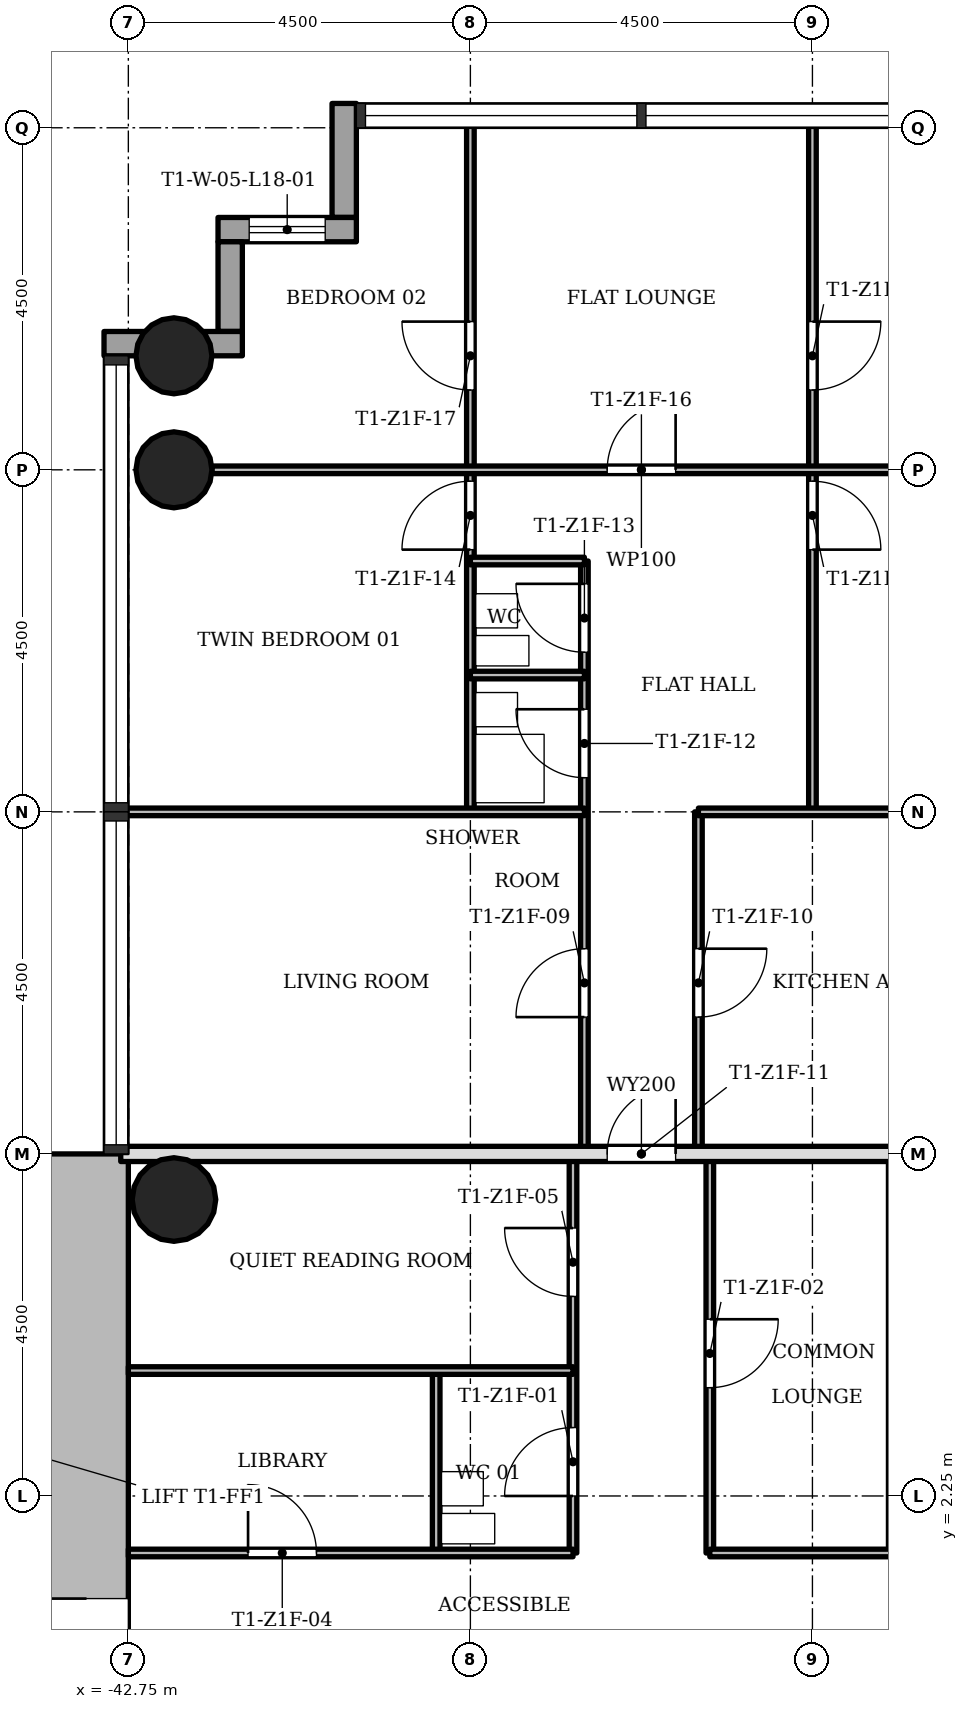
"""IFC4 building model, lengths in metres.
Left out: names, types, materials, properties, quantities, classifications, styles, units other than length and angle.
Written with IfcOpenShell. Run it as: python <this file> out.ifc"""

import sys

from ifc_helpers import new_model, si_unit, direction, frame, frame_2d, origin, origin_2d, place, context, subcontext, project, spatial, rectangle, hollow_circle, extrude, element, fill, save


model = new_model("IFC4")
c1 = context("Model", 3, precision=1e-05, world=origin(), true_north=direction((0.0, 1.0)))
c2 = subcontext(c1, "Body", "Model", "MODEL_VIEW")
j1 = project(units=[si_unit("LENGTHUNIT", "METRE"), si_unit("PLANEANGLEUNIT", "RADIAN")], contexts=[c1])
p1 = place(None, origin())
s1 = spatial("IfcSite", under=j1, at=p1, CompositionType="ELEMENT")
p2 = place(p1, origin())
s2 = spatial("IfcBuilding", under=s1, at=p2, CompositionType="ELEMENT")
p3 = place(p2, frame((0.0, 0.0, 68.7)))
s3 = spatial("IfcBuildingStorey", under=s2, at=p3, CompositionType="ELEMENT", Elevation=68.7)
p4 = place(p3, frame((-43.3, -5.65, 0.0), z_axis=(0.0, 0.0, 1.0), x_axis=(0.0, 1.0, 0.0)))
e1 = element("IfcWall", 1, at=p4, inside=s3, PredefinedType="SHEAR", context=c2, shape_type="SweptSolid", body=[
    extrude(rectangle(XDim=12.4, YDim=1.1, at=frame_2d((6.2, 0.0))), origin(), (0.0, 0.0, 1.0), 3.4),
])
p5 = place(p4, frame((4.75, 0.0, 0.0)))
e2 = element("IfcOpeningElement", 2, at=p5, cuts=e1, PredefinedType="OPENING", context=c2, shape_type="SweptSolid", body=[
    extrude(rectangle(XDim=1.8, YDim=2.1, at=frame_2d((0.9, 1.05))), frame((0.0, 0.56, 0.0), z_axis=(0.0, -1.0, 0.0), x_axis=(1.0, 0.0, 0.0)), (0.0, 0.0, 1.0), 1.12),
])
for number, where, z_axis, x_axis in (
    (3, (-42.15, 15.75, 0.0), (0.0, 0.0, 1.0), (1.0, 0.0, 0.0)),
    (4, (-42.15, 17.25, 0.0), (0.0, 0.0, 1.0), (1.0, 0.0, 0.0)),
):
    element("IfcColumn", number, at=place(p3, frame(where, z_axis=z_axis, x_axis=x_axis)), inside=s3, PredefinedType="COLUMN", context=c2, shape_type="SweptSolid", body=[
        extrude(hollow_circle(Radius=0.5, WallThickness=0.036, at=origin_2d()), origin(), (0.0, 0.0, 1.0), 3.4),
    ])
p6 = place(p3, frame((-42.15, 6.15, 0.0), z_axis=(0.0, 0.0, 1.0), x_axis=(1.0, 0.0, 0.0)))
e5 = element("IfcColumn", 5, at=p6, inside=s3, PredefinedType="COLUMN", context=c2, shape_type="SweptSolid", body=[
    extrude(hollow_circle(Radius=0.55, WallThickness=0.04, at=origin_2d()), origin(), (0.0, 0.0, 1.0), 3.4),
])
p7 = place(p3, frame((-39.91, 20.57, -0.3), z_axis=(0.0, 0.0, 1.0), x_axis=(0.0, -1.0, 0.0)))
e6 = element("IfcWall", 6, at=p7, inside=s3, PredefinedType="STANDARD", context=c2, shape_type="SweptSolid", body=[
    extrude(rectangle(XDim=1.5, YDim=0.32, at=frame_2d((0.75, 0.0))), origin(), (0.0, 0.0, 1.0), 3.4),
])
p8 = place(p3, frame((-39.75, 18.91, -0.3), z_axis=(0.0, 0.0, 1.0), x_axis=(-1.0, 0.0, 0.0)))
e7 = element("IfcWall", 7, at=p8, inside=s3, PredefinedType="STANDARD", context=c2, shape_type="SweptSolid", body=[
    extrude(rectangle(XDim=1.82, YDim=0.32, at=frame_2d((0.91, 0.0))), origin(), (0.0, 0.0, 1.0), 3.4),
])
p9 = place(p8, frame((0.41, 0.0, 1.2)))
e8 = element("IfcOpeningElement", 8, at=p9, cuts=e7, PredefinedType="OPENING", context=c2, shape_type="SweptSolid", body=[
    extrude(rectangle(XDim=1.0, YDim=1.5, at=frame_2d((0.5, 0.75))), frame((0.0, 0.17, 0.0), z_axis=(0.0, -1.0, 0.0), x_axis=(1.0, 0.0, 0.0)), (0.0, 0.0, 1.0), 0.34),
])
p10 = place(p3, frame((-41.41, 18.75, -0.3), z_axis=(0.0, 0.0, 1.0), x_axis=(0.0, -1.0, 0.0)))
e9 = element("IfcWall", 9, at=p10, inside=s3, PredefinedType="STANDARD", context=c2, shape_type="SweptSolid", body=[
    extrude(rectangle(XDim=1.18, YDim=0.32, at=frame_2d((0.59, 0.0))), origin(), (0.0, 0.0, 1.0), 3.4),
])
p11 = place(p3, frame((-41.25, 17.41, -0.3), z_axis=(0.0, 0.0, 1.0), x_axis=(-1.0, 0.0, 0.0)))
e10 = element("IfcWall", 10, at=p11, inside=s3, PredefinedType="STANDARD", context=c2, shape_type="SweptSolid", body=[
    extrude(rectangle(XDim=1.82, YDim=0.32, at=frame_2d((0.91, 0.0))), origin(), (0.0, 0.0, 1.0), 3.4),
])
p12 = place(p3, frame((-38.7, 1.5, 0.0), z_axis=(0.0, 0.0, 1.0), x_axis=(0.0, 1.0, 0.0)))
e11 = element("IfcWall", 11, at=p12, inside=s3, PredefinedType="PARTITIONING", context=c2, shape_type="SweptSolid", body=[
    extrude(rectangle(XDim=2.4, YDim=0.1, at=frame_2d((1.2, 0.0))), origin(), (0.0, 0.0, 1.0), 3.0),
])
p13 = place(p3, frame((-38.25, 11.25, 0.0), z_axis=(0.0, 0.0, 1.0), x_axis=(0.0, 1.0, 0.0)))
e12 = element("IfcWall", 12, at=p13, inside=s3, PredefinedType="PARTITIONING", context=c2, shape_type="SweptSolid", body=[
    extrude(rectangle(XDim=9.1, YDim=0.1, at=frame_2d((4.55, 0.0))), origin(), (0.0, 0.0, 1.0), 3.0),
])
p14 = place(p13, frame((3.45, 0.0, 0.0)))
e13 = element("IfcOpeningElement", 13, at=p14, cuts=e12, PredefinedType="OPENING", context=c2, shape_type="SweptSolid", body=[
    extrude(rectangle(XDim=0.9, YDim=2.1, at=frame_2d((0.45, 1.05))), frame((0.0, 0.06, 0.0), z_axis=(0.0, -1.0, 0.0), x_axis=(1.0, 0.0, 0.0)), (0.0, 0.0, 1.0), 0.12),
])
p15 = place(p13, frame((5.55, 0.0, 0.0)))
e14 = element("IfcOpeningElement", 14, at=p15, cuts=e12, PredefinedType="OPENING", context=c2, shape_type="SweptSolid", body=[
    extrude(rectangle(XDim=0.9, YDim=2.1, at=frame_2d((0.45, 1.05))), frame((0.0, 0.06, 0.0), z_axis=(0.0, -1.0, 0.0), x_axis=(1.0, 0.0, 0.0)), (0.0, 0.0, 1.0), 0.12),
])
p16 = place(p3, frame((-36.9, 1.5, 0.0), z_axis=(0.0, 0.0, 1.0), x_axis=(0.0, 1.0, 0.0)))
e15 = element("IfcWall", 15, at=p16, inside=s3, PredefinedType="PARTITIONING", context=c2, shape_type="SweptSolid", body=[
    extrude(rectangle(XDim=5.25, YDim=0.1, at=frame_2d((2.625, 0.0))), origin(), (0.0, 0.0, 1.0), 3.0),
])
p17 = place(p16, frame((0.75, 0.0, 0.0)))
e16 = element("IfcOpeningElement", 16, at=p17, cuts=e15, PredefinedType="OPENING", context=c2, shape_type="SweptSolid", body=[
    extrude(rectangle(XDim=0.9, YDim=2.1, at=frame_2d((0.45, 1.05))), frame((0.0, 0.06, 0.0), z_axis=(0.0, -1.0, 0.0), x_axis=(1.0, 0.0, 0.0)), (0.0, 0.0, 1.0), 0.12),
])
p18 = place(p16, frame((3.375, 0.0, 0.0)))
e17 = element("IfcOpeningElement", 17, at=p18, cuts=e15, PredefinedType="OPENING", context=c2, shape_type="SweptSolid", body=[
    extrude(rectangle(XDim=0.9, YDim=2.1, at=frame_2d((0.45, 1.05))), frame((0.0, 0.06, 0.0), z_axis=(0.0, -1.0, 0.0), x_axis=(1.0, 0.0, 0.0)), (0.0, 0.0, 1.0), 0.12),
])
p19 = place(p3, frame((-36.75, 6.75, 0.0), z_axis=(0.0, 0.0, 1.0), x_axis=(0.0, 1.0, 0.0)))
e18 = element("IfcWall", 18, at=p19, inside=s3, PredefinedType="PARTITIONING", context=c2, shape_type="SweptSolid", body=[
    extrude(rectangle(XDim=7.8, YDim=0.1, at=frame_2d((3.9, 0.0))), origin(), (0.0, 0.0, 1.0), 3.0),
])
p20 = place(p19, frame((1.8, 0.0, 0.0)))
e19 = element("IfcOpeningElement", 19, at=p20, cuts=e18, PredefinedType="OPENING", context=c2, shape_type="SweptSolid", body=[
    extrude(rectangle(XDim=0.9, YDim=2.1, at=frame_2d((0.45, 1.05))), frame((0.0, 0.06, 0.0), z_axis=(0.0, -1.0, 0.0), x_axis=(1.0, 0.0, 0.0)), (0.0, 0.0, 1.0), 0.12),
])
p21 = place(p19, frame((4.95, 0.0, 0.0)))
e20 = element("IfcOpeningElement", 20, at=p21, cuts=e18, PredefinedType="OPENING", context=c2, shape_type="SweptSolid", body=[
    extrude(rectangle(XDim=0.9, YDim=2.1, at=frame_2d((0.45, 1.05))), frame((0.0, 0.06, 0.0), z_axis=(0.0, -1.0, 0.0), x_axis=(1.0, 0.0, 0.0)), (0.0, 0.0, 1.0), 0.12),
])
p22 = place(p19, frame((6.6, 0.0, 0.0)))
e21 = element("IfcOpeningElement", 21, at=p22, cuts=e18, PredefinedType="OPENING", context=c2, shape_type="SweptSolid", body=[
    extrude(rectangle(XDim=0.9, YDim=2.1, at=frame_2d((0.45, 1.05))), frame((0.0, 0.06, 0.0), z_axis=(0.0, -1.0, 0.0), x_axis=(1.0, 0.0, 0.0)), (0.0, 0.0, 1.0), 0.12),
])
p23 = place(p3, frame((-35.25, 6.75, 0.0), z_axis=(0.0, 0.0, 1.0), x_axis=(0.0, 1.0, 0.0)))
e22 = element("IfcWall", 22, at=p23, inside=s3, PredefinedType="PARTITIONING", context=c2, shape_type="SweptSolid", body=[
    extrude(rectangle(XDim=4.5, YDim=0.1, at=frame_2d((2.25, 0.0))), origin(), (0.0, 0.0, 1.0), 3.0),
])
p24 = place(p23, frame((1.8, 0.0, 0.0)))
e23 = element("IfcOpeningElement", 23, at=p24, cuts=e22, PredefinedType="OPENING", context=c2, shape_type="SweptSolid", body=[
    extrude(rectangle(XDim=0.9, YDim=2.1, at=frame_2d((0.45, 1.05))), frame((0.0, 0.06, 0.0), z_axis=(0.0, -1.0, 0.0), x_axis=(1.0, 0.0, 0.0)), (0.0, 0.0, 1.0), 0.12),
])
p25 = place(p3, frame((-35.1, 1.5, 0.0), z_axis=(0.0, 0.0, 1.0), x_axis=(0.0, 1.0, 0.0)))
e24 = element("IfcWall", 24, at=p25, inside=s3, PredefinedType="PARTITIONING", context=c2, shape_type="SweptSolid", body=[
    extrude(rectangle(XDim=5.25, YDim=0.1, at=frame_2d((2.625, 0.0))), origin(), (0.0, 0.0, 1.0), 3.0),
])
p26 = place(p25, frame((2.175, 0.0, 0.0)))
e25 = element("IfcOpeningElement", 25, at=p26, cuts=e24, PredefinedType="OPENING", context=c2, shape_type="SweptSolid", body=[
    extrude(rectangle(XDim=0.9, YDim=2.1, at=frame_2d((0.45, 1.05))), frame((0.0, 0.06, 0.0), z_axis=(0.0, -1.0, 0.0), x_axis=(1.0, 0.0, 0.0)), (0.0, 0.0, 1.0), 0.12),
])
p27 = place(p3, frame((-33.75, 11.25, 0.0), z_axis=(0.0, 0.0, 1.0), x_axis=(0.0, 1.0, 0.0)))
e26 = element("IfcWall", 26, at=p27, inside=s3, PredefinedType="PARTITIONING", context=c2, shape_type="SweptSolid", body=[
    extrude(rectangle(XDim=9.1, YDim=0.1, at=frame_2d((4.55, 0.0))), origin(), (0.0, 0.0, 1.0), 3.0),
])
p28 = place(p27, frame((3.45, 0.0, 0.0)))
e27 = element("IfcOpeningElement", 27, at=p28, cuts=e26, PredefinedType="OPENING", context=c2, shape_type="SweptSolid", body=[
    extrude(rectangle(XDim=0.9, YDim=2.1, at=frame_2d((0.45, 1.05))), frame((0.0, 0.06, 0.0), z_axis=(0.0, -1.0, 0.0), x_axis=(1.0, 0.0, 0.0)), (0.0, 0.0, 1.0), 0.12),
])
p29 = place(p27, frame((5.55, 0.0, 0.0)))
e28 = element("IfcOpeningElement", 28, at=p29, cuts=e26, PredefinedType="OPENING", context=c2, shape_type="SweptSolid", body=[
    extrude(rectangle(XDim=0.9, YDim=2.1, at=frame_2d((0.45, 1.05))), frame((0.0, 0.06, 0.0), z_axis=(0.0, -1.0, 0.0), x_axis=(1.0, 0.0, 0.0)), (0.0, 0.0, 1.0), 0.12),
])
p30 = place(p3, frame((-42.75, 1.5, 0.0), z_axis=(0.0, 0.0, 1.0), x_axis=(1.0, 0.0, 0.0)))
e29 = element("IfcWall", 29, at=p30, inside=s3, PredefinedType="PARTITIONING", context=c2, shape_type="SweptSolid", body=[
    extrude(rectangle(XDim=5.85, YDim=0.1, at=frame_2d((2.925, 0.0))), origin(), (0.0, 0.0, 1.0), 3.0),
])
p31 = place(p30, frame((1.575, 0.0, 0.0)))
e30 = element("IfcOpeningElement", 30, at=p31, cuts=e29, PredefinedType="OPENING", context=c2, shape_type="SweptSolid", body=[
    extrude(rectangle(XDim=0.9, YDim=2.1, at=frame_2d((0.45, 1.05))), frame((0.0, 0.06, 0.0), z_axis=(0.0, -1.0, 0.0), x_axis=(1.0, 0.0, 0.0)), (0.0, 0.0, 1.0), 0.12),
])
p32 = place(p3, frame((-35.1, 1.5, 0.0), z_axis=(0.0, 0.0, 1.0), x_axis=(1.0, 0.0, 0.0)))
e31 = element("IfcWall", 31, at=p32, inside=s3, PredefinedType="PARTITIONING", context=c2, shape_type="SweptSolid", body=[
    extrude(rectangle(XDim=5.85, YDim=0.1, at=frame_2d((2.925, 0.0))), origin(), (0.0, 0.0, 1.0), 3.0),
])
p33 = place(p32, frame((3.675, 0.0, 0.0)))
e32 = element("IfcOpeningElement", 32, at=p33, cuts=e31, PredefinedType="OPENING", context=c2, shape_type="SweptSolid", body=[
    extrude(rectangle(XDim=0.9, YDim=2.1, at=frame_2d((0.45, 1.05))), frame((0.0, 0.06, 0.0), z_axis=(0.0, -1.0, 0.0), x_axis=(1.0, 0.0, 0.0)), (0.0, 0.0, 1.0), 0.12),
])
p34 = place(p3, frame((-42.75, 3.9, 0.0), z_axis=(0.0, 0.0, 1.0), x_axis=(1.0, 0.0, 0.0)))
e33 = element("IfcWall", 33, at=p34, inside=s3, PredefinedType="PARTITIONING", context=c2, shape_type="SweptSolid", body=[
    extrude(rectangle(XDim=5.85, YDim=0.1, at=frame_2d((2.925, 0.0))), origin(), (0.0, 0.0, 1.0), 3.0),
])
p35 = place(p3, frame((-42.85, 6.75, 0.0), z_axis=(0.0, 0.0, 1.0), x_axis=(1.0, 0.0, 0.0)))
e34 = element("IfcWall", 34, at=p35, inside=s3, PredefinedType="SOLIDWALL", context=c2, shape_type="SweptSolid", body=[
    extrude(rectangle(XDim=13.7, YDim=0.2, at=frame_2d((6.85, 0.0))), origin(), (0.0, 0.0, 1.0), 3.0),
])
p36 = place(p35, frame((6.4, 0.0, 0.0)))
e35 = element("IfcOpeningElement", 35, at=p36, cuts=e34, PredefinedType="OPENING", context=c2, shape_type="SweptSolid", body=[
    extrude(rectangle(XDim=0.9, YDim=2.1, at=frame_2d((0.45, 1.05))), frame((0.0, 0.11, 0.0), z_axis=(0.0, -1.0, 0.0), x_axis=(1.0, 0.0, 0.0)), (0.0, 0.0, 1.0), 0.22),
])
for number, where, z_axis, x_axis in (
    (36, (-42.85, 11.25, 0.0), (0.0, 0.0, 1.0), (1.0, 0.0, 0.0)),
    (37, (-35.25, 11.25, 0.0), (0.0, 0.0, 1.0), (1.0, 0.0, 0.0)),
):
    element("IfcWall", number, at=place(p3, frame(where, z_axis=z_axis, x_axis=x_axis)), inside=s3, PredefinedType="PARTITIONING", context=c2, shape_type="SweptSolid", body=[
        extrude(rectangle(XDim=6.1, YDim=0.1, at=frame_2d((3.05, 0.0))), origin(), (0.0, 0.0, 1.0), 3.0),
    ])
for number, where, z_axis, x_axis in (
    (38, (-38.25, 13.05, 0.0), (0.0, 0.0, 1.0), (1.0, 0.0, 0.0)),
    (39, (-38.25, 14.55, 0.0), (0.0, 0.0, 1.0), (1.0, 0.0, 0.0)),
):
    element("IfcWall", number, at=place(p3, frame(where, z_axis=z_axis, x_axis=x_axis)), inside=s3, PredefinedType="PARTITIONING", context=c2, shape_type="SweptSolid", body=[
        extrude(rectangle(XDim=1.5, YDim=0.1, at=frame_2d((0.75, 0.0))), origin(), (0.0, 0.0, 1.0), 3.0),
    ])
p37 = place(p3, frame((-41.65, 15.75, 0.0), z_axis=(0.0, 0.0, 1.0), x_axis=(1.0, 0.0, 0.0)))
e40 = element("IfcWall", 40, at=p37, inside=s3, PredefinedType="PARTITIONING", context=c2, shape_type="SweptSolid", body=[
    extrude(rectangle(XDim=11.3, YDim=0.1, at=frame_2d((5.65, 0.0))), origin(), (0.0, 0.0, 1.0), 3.0),
])
p38 = place(p37, frame((5.2, 0.0, 0.0)))
e41 = element("IfcOpeningElement", 41, at=p38, cuts=e40, PredefinedType="OPENING", context=c2, shape_type="SweptSolid", body=[
    extrude(rectangle(XDim=0.9, YDim=2.1, at=frame_2d((0.45, 1.05))), frame((0.0, 0.06, 0.0), z_axis=(0.0, -1.0, 0.0), x_axis=(1.0, 0.0, 0.0)), (0.0, 0.0, 1.0), 0.12),
])
p39 = place(p17, origin())
e42 = element("IfcDoor", 42, at=p39, inside=s3, OperationType="SINGLE_SWING_RIGHT", PredefinedType="DOOR", context=c2, shape_type="SweptSolid", body=[
    extrude(rectangle(XDim=0.9, YDim=2.1, at=frame_2d((0.45, 1.05))), frame((0.0, 0.025, 0.0), z_axis=(0.0, -1.0, 0.0), x_axis=(1.0, 0.0, 0.0)), (0.0, 0.0, 1.0), 0.05),
])
fill(e16, e42)
p40 = place(p26, origin())
e43 = element("IfcDoor", 43, at=p40, inside=s3, OperationType="SINGLE_SWING_RIGHT", PredefinedType="DOOR", context=c2, shape_type="SweptSolid", body=[
    extrude(rectangle(XDim=0.9, YDim=2.1, at=frame_2d((0.45, 1.05))), frame((0.0, 0.025, 0.0), z_axis=(0.0, -1.0, 0.0), x_axis=(1.0, 0.0, 0.0)), (0.0, 0.0, 1.0), 0.05),
])
fill(e25, e43)
p41 = place(p31, origin())
e44 = element("IfcDoor", 44, at=p41, inside=s3, OperationType="SINGLE_SWING_RIGHT", PredefinedType="DOOR", context=c2, shape_type="SweptSolid", body=[
    extrude(rectangle(XDim=0.9, YDim=2.1, at=frame_2d((0.45, 1.05))), frame((0.0, 0.025, 0.0), z_axis=(0.0, -1.0, 0.0), x_axis=(1.0, 0.0, 0.0)), (0.0, 0.0, 1.0), 0.05),
])
fill(e30, e44)
p42 = place(p18, origin())
e45 = element("IfcDoor", 45, at=p42, inside=s3, OperationType="SINGLE_SWING_LEFT", PredefinedType="DOOR", context=c2, shape_type="SweptSolid", body=[
    extrude(rectangle(XDim=0.9, YDim=2.1, at=frame_2d((0.45, 1.05))), frame((0.0, 0.025, 0.0), z_axis=(0.0, -1.0, 0.0), x_axis=(1.0, 0.0, 0.0)), (0.0, 0.0, 1.0), 0.05),
])
fill(e17, e45)
p43 = place(p20, origin())
e46 = element("IfcDoor", 46, at=p43, inside=s3, OperationType="SINGLE_SWING_RIGHT", PredefinedType="DOOR", context=c2, shape_type="SweptSolid", body=[
    extrude(rectangle(XDim=0.9, YDim=2.1, at=frame_2d((0.45, 1.05))), frame((0.0, 0.025, 0.0), z_axis=(0.0, -1.0, 0.0), x_axis=(1.0, 0.0, 0.0)), (0.0, 0.0, 1.0), 0.05),
])
fill(e19, e46)
p44 = place(p24, origin())
e47 = element("IfcDoor", 47, at=p44, inside=s3, OperationType="SINGLE_SWING_RIGHT", PredefinedType="DOOR", context=c2, shape_type="SweptSolid", body=[
    extrude(rectangle(XDim=0.9, YDim=2.1, at=frame_2d((0.45, 1.05))), frame((0.0, 0.025, 0.0), z_axis=(0.0, -1.0, 0.0), x_axis=(1.0, 0.0, 0.0)), (0.0, 0.0, 1.0), 0.05),
])
fill(e23, e47)
p45 = place(p36, origin())
e48 = element("IfcDoor", 48, at=p45, inside=s3, OperationType="SINGLE_SWING_LEFT", PredefinedType="DOOR", context=c2, shape_type="SweptSolid", body=[
    extrude(rectangle(XDim=0.9, YDim=2.1, at=frame_2d((0.45, 1.05))), frame((0.0, 0.025, 0.0), z_axis=(0.0, -1.0, 0.0), x_axis=(1.0, 0.0, 0.0)), (0.0, 0.0, 1.0), 0.05),
])
fill(e35, e48)
p46 = place(p21, origin())
e49 = element("IfcDoor", 49, at=p46, inside=s3, OperationType="SINGLE_SWING_LEFT", PredefinedType="DOOR", context=c2, shape_type="SweptSolid", body=[
    extrude(rectangle(XDim=0.9, YDim=2.1, at=frame_2d((0.45, 1.05))), frame((0.0, 0.025, 0.0), z_axis=(0.0, -1.0, 0.0), x_axis=(1.0, 0.0, 0.0)), (0.0, 0.0, 1.0), 0.05),
])
fill(e20, e49)
p47 = place(p22, origin())
e50 = element("IfcDoor", 50, at=p47, inside=s3, OperationType="SINGLE_SWING_LEFT", PredefinedType="DOOR", context=c2, shape_type="SweptSolid", body=[
    extrude(rectangle(XDim=0.9, YDim=2.1, at=frame_2d((0.45, 1.05))), frame((0.0, 0.025, 0.0), z_axis=(0.0, -1.0, 0.0), x_axis=(1.0, 0.0, 0.0)), (0.0, 0.0, 1.0), 0.05),
])
fill(e21, e50)
p48 = place(p14, origin())
e51 = element("IfcDoor", 51, at=p48, inside=s3, OperationType="SINGLE_SWING_RIGHT", PredefinedType="DOOR", context=c2, shape_type="SweptSolid", body=[
    extrude(rectangle(XDim=0.9, YDim=2.1, at=frame_2d((0.45, 1.05))), frame((0.0, 0.025, 0.0), z_axis=(0.0, -1.0, 0.0), x_axis=(1.0, 0.0, 0.0)), (0.0, 0.0, 1.0), 0.05),
])
fill(e13, e51)
p49 = place(p28, origin())
e52 = element("IfcDoor", 52, at=p49, inside=s3, OperationType="SINGLE_SWING_LEFT", PredefinedType="DOOR", context=c2, shape_type="SweptSolid", body=[
    extrude(rectangle(XDim=0.9, YDim=2.1, at=frame_2d((0.45, 1.05))), frame((0.0, 0.025, 0.0), z_axis=(0.0, -1.0, 0.0), x_axis=(1.0, 0.0, 0.0)), (0.0, 0.0, 1.0), 0.05),
])
fill(e27, e52)
p50 = place(p38, origin())
e53 = element("IfcDoor", 53, at=p50, inside=s3, OperationType="SINGLE_SWING_LEFT", PredefinedType="DOOR", context=c2, shape_type="SweptSolid", body=[
    extrude(rectangle(XDim=0.9, YDim=2.1, at=frame_2d((0.45, 1.05))), frame((0.0, 0.025, 0.0), z_axis=(0.0, -1.0, 0.0), x_axis=(1.0, 0.0, 0.0)), (0.0, 0.0, 1.0), 0.05),
])
fill(e41, e53)
p51 = place(p15, origin())
e54 = element("IfcDoor", 54, at=p51, inside=s3, OperationType="SINGLE_SWING_LEFT", PredefinedType="DOOR", context=c2, shape_type="SweptSolid", body=[
    extrude(rectangle(XDim=0.9, YDim=2.1, at=frame_2d((0.45, 1.05))), frame((0.0, 0.025, 0.0), z_axis=(0.0, -1.0, 0.0), x_axis=(1.0, 0.0, 0.0)), (0.0, 0.0, 1.0), 0.05),
])
fill(e14, e54)
p52 = place(p29, origin())
e55 = element("IfcDoor", 55, at=p52, inside=s3, OperationType="SINGLE_SWING_RIGHT", PredefinedType="DOOR", context=c2, shape_type="SweptSolid", body=[
    extrude(rectangle(XDim=0.9, YDim=2.1, at=frame_2d((0.45, 1.05))), frame((0.0, 0.025, 0.0), z_axis=(0.0, -1.0, 0.0), x_axis=(1.0, 0.0, 0.0)), (0.0, 0.0, 1.0), 0.05),
])
fill(e28, e55)
p53 = place(p5, origin())
e56 = element("IfcDoor", 56, at=p53, inside=s3, OperationType="SINGLE_SWING_LEFT", PredefinedType="DOOR", context=c2, shape_type="SweptSolid", body=[
    extrude(rectangle(XDim=1.8, YDim=2.1, at=frame_2d((0.9, 1.05))), frame((0.0, 0.025, 0.0), z_axis=(0.0, -1.0, 0.0), x_axis=(1.0, 0.0, 0.0)), (0.0, 0.0, 1.0), 0.05),
])
fill(e2, e56)
p54 = place(p9, origin())
e57 = element("IfcWindow", 57, at=p54, inside=s3, PartitioningType="SINGLE_PANEL", PredefinedType="WINDOW", context=c2, shape_type="SweptSolid", body=[
    extrude(rectangle(XDim=1.0, YDim=1.5, at=frame_2d((0.5, 0.75))), frame((0.0, 0.03, 0.0), z_axis=(0.0, -1.0, 0.0), x_axis=(1.0, 0.0, 0.0)), (0.0, 0.0, 1.0), 0.06),
])
fill(e8, e57)
save(model, sys.argv[1])
